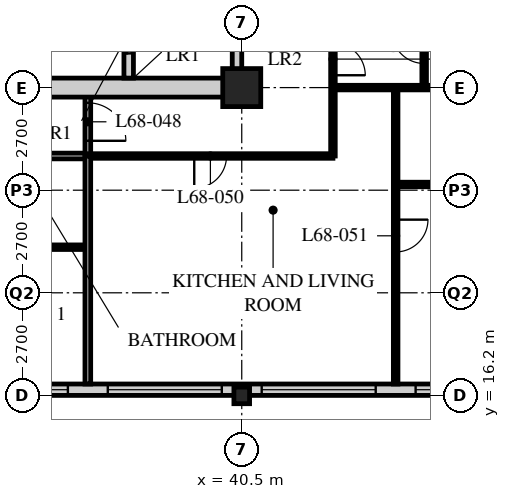
"""IFC4 building model, lengths in metres.
Left out: names, types, materials, properties, quantities, classifications, styles, units other than length and angle.
Written with IfcOpenShell. Run it as: python <this file> out.ifc"""

import sys

from ifc_helpers import new_model, si_unit, direction, frame, frame_2d, origin, origin_2d, place, context, subcontext, project, spatial, rectangle, hollow_rectangle, i_section, extrude, element, fill, save


model = new_model("IFC4")
c1 = context("Model", 3, precision=1e-05, world=origin(), true_north=direction((0.0, 1.0)))
c2 = subcontext(c1, "Body", "Model", "MODEL_VIEW")
j1 = project(units=[si_unit("LENGTHUNIT", "METRE"), si_unit("PLANEANGLEUNIT", "RADIAN")], contexts=[c1])
p1 = place(None, origin())
s1 = spatial("IfcSite", under=j1, at=p1, CompositionType="ELEMENT")
p2 = place(p1, origin())
s2 = spatial("IfcBuilding", under=s1, at=p2, CompositionType="ELEMENT")
p3 = place(p2, frame((0.0, 0.0, 265.8)))
s3 = spatial("IfcBuildingStorey", under=s2, at=p3, CompositionType="ELEMENT", Elevation=265.8)
p4 = place(p3, frame((40.5, 16.2, 0.0), z_axis=(0.0, 0.0, 1.0), x_axis=(1.0, 0.0, 0.0)))
e1 = element("IfcColumn", 1, at=p4, inside=s3, PredefinedType="COLUMN", context=c2, shape_type="SweptSolid", body=[
    extrude(i_section(OverallWidth=0.412, OverallDepth=0.437, WebThickness=0.036, FlangeThickness=0.058, FilletRadius=0.015, at=origin_2d()), origin(), (0.0, 0.0, 1.0), 3.9),
])
p5 = place(p3, frame((40.5, 24.3, 0.0), z_axis=(0.0, 0.0, 1.0), x_axis=(1.0, 0.0, 0.0)))
e2 = element("IfcColumn", 2, at=p5, inside=s3, PredefinedType="COLUMN", context=c2, shape_type="SweptSolid", body=[
    extrude(hollow_rectangle(XDim=1.0, YDim=1.0, WallThickness=0.1, at=origin_2d()), origin(), (0.0, 0.0, 1.0), 3.9),
])
p6 = place(p3, frame((8.4, 16.35, 0.0), z_axis=(0.0, 0.0, 1.0), x_axis=(1.0, 0.0, 0.0)))
e3 = element("IfcWall", 3, at=p6, inside=s3, PredefinedType="SOLIDWALL", context=c2, shape_type="SweptSolid", body=[
    extrude(rectangle(XDim=40.2, YDim=0.3, at=frame_2d((20.1, 0.0))), origin(), (0.0, 0.0, 1.0), 3.69),
])
p7 = place(p6, frame((0.225, 0.0, 0.6)))
e4 = element("IfcOpeningElement", 4, at=p7, cuts=e3, PredefinedType="OPENING", context=c2, shape_type="SweptSolid", body=[
    extrude(rectangle(XDim=3.0, YDim=2.4, at=frame_2d((1.5, 1.2))), frame((0.0, 0.16, 0.0), z_axis=(0.0, -1.0, 0.0), x_axis=(1.0, 0.0, 0.0)), (0.0, 0.0, 1.0), 0.32),
])
p8 = place(p6, frame((4.275, 0.0, 0.6)))
e5 = element("IfcOpeningElement", 5, at=p8, cuts=e3, PredefinedType="OPENING", context=c2, shape_type="SweptSolid", body=[
    extrude(rectangle(XDim=3.0, YDim=2.4, at=frame_2d((1.5, 1.2))), frame((0.0, 0.16, 0.0), z_axis=(0.0, -1.0, 0.0), x_axis=(1.0, 0.0, 0.0)), (0.0, 0.0, 1.0), 0.32),
])
p9 = place(p6, frame((8.325, 0.0, 0.6)))
e6 = element("IfcOpeningElement", 6, at=p9, cuts=e3, PredefinedType="OPENING", context=c2, shape_type="SweptSolid", body=[
    extrude(rectangle(XDim=3.0, YDim=2.4, at=frame_2d((1.5, 1.2))), frame((0.0, 0.16, 0.0), z_axis=(0.0, -1.0, 0.0), x_axis=(1.0, 0.0, 0.0)), (0.0, 0.0, 1.0), 0.32),
])
p10 = place(p6, frame((12.375, 0.0, 0.6)))
e7 = element("IfcOpeningElement", 7, at=p10, cuts=e3, PredefinedType="OPENING", context=c2, shape_type="SweptSolid", body=[
    extrude(rectangle(XDim=3.0, YDim=2.4, at=frame_2d((1.5, 1.2))), frame((0.0, 0.16, 0.0), z_axis=(0.0, -1.0, 0.0), x_axis=(1.0, 0.0, 0.0)), (0.0, 0.0, 1.0), 0.32),
])
p11 = place(p6, frame((16.425, 0.0, 0.6)))
e8 = element("IfcOpeningElement", 8, at=p11, cuts=e3, PredefinedType="OPENING", context=c2, shape_type="SweptSolid", body=[
    extrude(rectangle(XDim=3.0, YDim=2.4, at=frame_2d((1.5, 1.2))), frame((0.0, 0.16, 0.0), z_axis=(0.0, -1.0, 0.0), x_axis=(1.0, 0.0, 0.0)), (0.0, 0.0, 1.0), 0.32),
])
p12 = place(p6, frame((20.475, 0.0, 0.6)))
e9 = element("IfcOpeningElement", 9, at=p12, cuts=e3, PredefinedType="OPENING", context=c2, shape_type="SweptSolid", body=[
    extrude(rectangle(XDim=3.0, YDim=2.4, at=frame_2d((1.5, 1.2))), frame((0.0, 0.16, 0.0), z_axis=(0.0, -1.0, 0.0), x_axis=(1.0, 0.0, 0.0)), (0.0, 0.0, 1.0), 0.32),
])
p13 = place(p6, frame((24.525, 0.0, 0.6)))
e10 = element("IfcOpeningElement", 10, at=p13, cuts=e3, PredefinedType="OPENING", context=c2, shape_type="SweptSolid", body=[
    extrude(rectangle(XDim=3.0, YDim=2.4, at=frame_2d((1.5, 1.2))), frame((0.0, 0.16, 0.0), z_axis=(0.0, -1.0, 0.0), x_axis=(1.0, 0.0, 0.0)), (0.0, 0.0, 1.0), 0.32),
])
p14 = place(p6, frame((28.575, 0.0, 0.6)))
e11 = element("IfcOpeningElement", 11, at=p14, cuts=e3, PredefinedType="OPENING", context=c2, shape_type="SweptSolid", body=[
    extrude(rectangle(XDim=3.0, YDim=2.4, at=frame_2d((1.5, 1.2))), frame((0.0, 0.16, 0.0), z_axis=(0.0, -1.0, 0.0), x_axis=(1.0, 0.0, 0.0)), (0.0, 0.0, 1.0), 0.32),
])
p15 = place(p6, frame((32.625, 0.0, 0.6)))
e12 = element("IfcOpeningElement", 12, at=p15, cuts=e3, PredefinedType="OPENING", context=c2, shape_type="SweptSolid", body=[
    extrude(rectangle(XDim=3.0, YDim=2.4, at=frame_2d((1.5, 1.2))), frame((0.0, 0.16, 0.0), z_axis=(0.0, -1.0, 0.0), x_axis=(1.0, 0.0, 0.0)), (0.0, 0.0, 1.0), 0.32),
])
p16 = place(p6, frame((36.675, 0.0, 0.6)))
e13 = element("IfcOpeningElement", 13, at=p16, cuts=e3, PredefinedType="OPENING", context=c2, shape_type="SweptSolid", body=[
    extrude(rectangle(XDim=3.0, YDim=2.4, at=frame_2d((1.5, 1.2))), frame((0.0, 0.16, 0.0), z_axis=(0.0, -1.0, 0.0), x_axis=(1.0, 0.0, 0.0)), (0.0, 0.0, 1.0), 0.32),
])
p17 = place(p3, frame((8.1, 22.5, 0.0), z_axis=(0.0, 0.0, 1.0), x_axis=(1.0, 0.0, 0.0)))
e14 = element("IfcWall", 14, at=p17, inside=s3, PredefinedType="PARTITIONING", context=c2, shape_type="SweptSolid", body=[
    extrude(rectangle(XDim=28.35, YDim=0.15, at=frame_2d((14.175, 0.0))), origin(), (0.0, 0.0, 1.0), 3.69),
])
p18 = place(p17, frame((4.45, 0.0, 0.0)))
e15 = element("IfcOpeningElement", 15, at=p18, cuts=e14, PredefinedType="OPENING", context=c2, shape_type="SweptSolid", body=[
    extrude(rectangle(XDim=1.0, YDim=2.1, at=frame_2d((0.5, 1.05))), frame((0.0, 0.085, 0.0), z_axis=(0.0, -1.0, 0.0), x_axis=(1.0, 0.0, 0.0)), (0.0, 0.0, 1.0), 0.17),
])
p19 = place(p17, frame((12.55, 0.0, 0.0)))
e16 = element("IfcOpeningElement", 16, at=p19, cuts=e14, PredefinedType="OPENING", context=c2, shape_type="SweptSolid", body=[
    extrude(rectangle(XDim=1.0, YDim=2.1, at=frame_2d((0.5, 1.05))), frame((0.0, 0.085, 0.0), z_axis=(0.0, -1.0, 0.0), x_axis=(1.0, 0.0, 0.0)), (0.0, 0.0, 1.0), 0.17),
])
p20 = place(p17, frame((20.65, 0.0, 0.0)))
e17 = element("IfcOpeningElement", 17, at=p20, cuts=e14, PredefinedType="OPENING", context=c2, shape_type="SweptSolid", body=[
    extrude(rectangle(XDim=1.0, YDim=2.1, at=frame_2d((0.5, 1.05))), frame((0.0, 0.085, 0.0), z_axis=(0.0, -1.0, 0.0), x_axis=(1.0, 0.0, 0.0)), (0.0, 0.0, 1.0), 0.17),
])
p21 = place(p17, frame((2.625, 0.0, 0.0)))
e18 = element("IfcOpeningElement", 18, at=p21, cuts=e14, PredefinedType="OPENING", context=c2, shape_type="SweptSolid", body=[
    extrude(rectangle(XDim=1.0, YDim=2.1, at=frame_2d((0.5, 1.05))), frame((0.0, 0.085, 0.0), z_axis=(0.0, -1.0, 0.0), x_axis=(1.0, 0.0, 0.0)), (0.0, 0.0, 1.0), 0.17),
])
p22 = place(p3, frame((36.45, 22.5, 0.0), z_axis=(0.0, 0.0, 1.0), x_axis=(0.0, 1.0, 0.0)))
e19 = element("IfcWall", 19, at=p22, inside=s3, PredefinedType="PARTITIONING", context=c2, shape_type="SweptSolid", body=[
    extrude(rectangle(XDim=1.8, YDim=0.15, at=frame_2d((0.9, 0.0))), origin(), (0.0, 0.0, 1.0), 3.69),
])
p23 = place(p22, frame((0.4, 0.0, 0.0)))
e20 = element("IfcOpeningElement", 20, at=p23, cuts=e19, PredefinedType="OPENING", context=c2, shape_type="SweptSolid", body=[
    extrude(rectangle(XDim=1.0, YDim=2.1, at=frame_2d((0.5, 1.05))), frame((0.0, 0.085, 0.0), z_axis=(0.0, -1.0, 0.0), x_axis=(1.0, 0.0, 0.0)), (0.0, 0.0, 1.0), 0.17),
])
p24 = place(p3, frame((8.1, 20.1, 0.0), z_axis=(0.0, 0.0, 1.0), x_axis=(1.0, 0.0, 0.0)))
e21 = element("IfcWall", 21, at=p24, inside=s3, PredefinedType="PARTITIONING", context=c2, shape_type="SweptSolid", body=[
    extrude(rectangle(XDim=28.35, YDim=0.12, at=frame_2d((14.175, 0.0))), origin(), (0.0, 0.0, 1.0), 3.69),
])
p25 = place(p24, frame((5.025, 0.0, 0.0)))
e22 = element("IfcOpeningElement", 22, at=p25, cuts=e21, PredefinedType="OPENING", context=c2, shape_type="SweptSolid", body=[
    extrude(rectangle(XDim=0.85, YDim=2.1, at=frame_2d((0.425, 1.05))), frame((0.0, 0.07, 0.0), z_axis=(0.0, -1.0, 0.0), x_axis=(1.0, 0.0, 0.0)), (0.0, 0.0, 1.0), 0.14),
])
p26 = place(p24, frame((8.425, 0.0, 0.0)))
e23 = element("IfcOpeningElement", 23, at=p26, cuts=e21, PredefinedType="OPENING", context=c2, shape_type="SweptSolid", body=[
    extrude(rectangle(XDim=0.85, YDim=2.1, at=frame_2d((0.425, 1.05))), frame((0.0, 0.07, 0.0), z_axis=(0.0, -1.0, 0.0), x_axis=(1.0, 0.0, 0.0)), (0.0, 0.0, 1.0), 0.14),
])
p27 = place(p24, frame((13.125, 0.0, 0.0)))
e24 = element("IfcOpeningElement", 24, at=p27, cuts=e21, PredefinedType="OPENING", context=c2, shape_type="SweptSolid", body=[
    extrude(rectangle(XDim=0.85, YDim=2.1, at=frame_2d((0.425, 1.05))), frame((0.0, 0.07, 0.0), z_axis=(0.0, -1.0, 0.0), x_axis=(1.0, 0.0, 0.0)), (0.0, 0.0, 1.0), 0.14),
])
p28 = place(p24, frame((16.525, 0.0, 0.0)))
e25 = element("IfcOpeningElement", 25, at=p28, cuts=e21, PredefinedType="OPENING", context=c2, shape_type="SweptSolid", body=[
    extrude(rectangle(XDim=0.85, YDim=2.1, at=frame_2d((0.425, 1.05))), frame((0.0, 0.07, 0.0), z_axis=(0.0, -1.0, 0.0), x_axis=(1.0, 0.0, 0.0)), (0.0, 0.0, 1.0), 0.14),
])
p29 = place(p24, frame((21.225, 0.0, 0.0)))
e26 = element("IfcOpeningElement", 26, at=p29, cuts=e21, PredefinedType="OPENING", context=c2, shape_type="SweptSolid", body=[
    extrude(rectangle(XDim=0.85, YDim=2.1, at=frame_2d((0.425, 1.05))), frame((0.0, 0.07, 0.0), z_axis=(0.0, -1.0, 0.0), x_axis=(1.0, 0.0, 0.0)), (0.0, 0.0, 1.0), 0.14),
])
p30 = place(p24, frame((24.625, 0.0, 0.0)))
e27 = element("IfcOpeningElement", 27, at=p30, cuts=e21, PredefinedType="OPENING", context=c2, shape_type="SweptSolid", body=[
    extrude(rectangle(XDim=0.85, YDim=2.1, at=frame_2d((0.425, 1.05))), frame((0.0, 0.07, 0.0), z_axis=(0.0, -1.0, 0.0), x_axis=(1.0, 0.0, 0.0)), (0.0, 0.0, 1.0), 0.14),
])
p31 = place(p24, frame((2.725, 0.0, 0.0)))
e28 = element("IfcOpeningElement", 28, at=p31, cuts=e21, PredefinedType="OPENING", context=c2, shape_type="SweptSolid", body=[
    extrude(rectangle(XDim=0.85, YDim=2.1, at=frame_2d((0.425, 1.05))), frame((0.0, 0.07, 0.0), z_axis=(0.0, -1.0, 0.0), x_axis=(1.0, 0.0, 0.0)), (0.0, 0.0, 1.0), 0.14),
])
p32 = place(p3, frame((42.9, 22.5, 0.0), z_axis=(0.0, 0.0, 1.0), x_axis=(0.0, 1.0, 0.0)))
e29 = element("IfcWall", 29, at=p32, inside=s3, PredefinedType="PARTITIONING", context=c2, shape_type="SweptSolid", body=[
    extrude(rectangle(XDim=9.9, YDim=0.12, at=frame_2d((4.95, 0.0))), origin(), (0.0, 0.0, 1.0), 3.69),
])
p33 = place(p32, frame((2.125, 0.0, 0.0)))
e30 = element("IfcOpeningElement", 30, at=p33, cuts=e29, PredefinedType="OPENING", context=c2, shape_type="SweptSolid", body=[
    extrude(rectangle(XDim=0.85, YDim=2.1, at=frame_2d((0.425, 1.05))), frame((0.0, 0.07, 0.0), z_axis=(0.0, -1.0, 0.0), x_axis=(1.0, 0.0, 0.0)), (0.0, 0.0, 1.0), 0.14),
])
p34 = place(p32, frame((6.175, 0.0, 0.0)))
e31 = element("IfcOpeningElement", 31, at=p34, cuts=e29, PredefinedType="OPENING", context=c2, shape_type="SweptSolid", body=[
    extrude(rectangle(XDim=0.85, YDim=2.1, at=frame_2d((0.425, 1.05))), frame((0.0, 0.07, 0.0), z_axis=(0.0, -1.0, 0.0), x_axis=(1.0, 0.0, 0.0)), (0.0, 0.0, 1.0), 0.14),
])
p35 = place(p3, frame((36.45, 22.5, 0.0), z_axis=(0.0, 0.0, 1.0), x_axis=(1.0, 0.0, 0.0)))
e32 = element("IfcWall", 32, at=p35, inside=s3, PredefinedType="PARTITIONING", context=c2, shape_type="SweptSolid", body=[
    extrude(rectangle(XDim=6.45, YDim=0.12, at=frame_2d((3.225, 0.0))), origin(), (0.0, 0.0, 1.0), 3.69),
])
p36 = place(p35, frame((2.8, 0.0, 0.0)))
e33 = element("IfcOpeningElement", 33, at=p36, cuts=e32, PredefinedType="OPENING", context=c2, shape_type="SweptSolid", body=[
    extrude(rectangle(XDim=0.85, YDim=2.1, at=frame_2d((0.425, 1.05))), frame((0.0, 0.07, 0.0), z_axis=(0.0, -1.0, 0.0), x_axis=(1.0, 0.0, 0.0)), (0.0, 0.0, 1.0), 0.14),
])
p37 = place(p3, frame((42.9, 24.3, 0.0), z_axis=(0.0, 0.0, 1.0), x_axis=(1.0, 0.0, 0.0)))
e34 = element("IfcWall", 34, at=p37, inside=s3, PredefinedType="PARTITIONING", context=c2, shape_type="SweptSolid", body=[
    extrude(rectangle(XDim=9.45, YDim=0.12, at=frame_2d((4.725, 0.0))), origin(), (0.0, 0.0, 1.0), 3.078),
])
p38 = place(p3, frame((36.45, 16.5, 0.0), z_axis=(0.0, 0.0, 1.0), x_axis=(0.0, 1.0, 0.0)))
e35 = element("IfcWall", 35, at=p38, inside=s3, PredefinedType="PARTITIONING", context=c2, shape_type="SweptSolid", body=[
    extrude(rectangle(XDim=6.0, YDim=0.15, at=frame_2d((3.0, 0.0))), origin(), (0.0, 0.0, 1.0), 3.69),
])
p39 = place(p3, frame((44.55, 16.5, 0.0), z_axis=(0.0, 0.0, 1.0), x_axis=(0.0, 1.0, 0.0)))
e36 = element("IfcWall", 36, at=p39, inside=s3, PredefinedType="PARTITIONING", context=c2, shape_type="SweptSolid", body=[
    extrude(rectangle(XDim=7.8, YDim=0.12, at=frame_2d((3.9, 0.0))), origin(), (0.0, 0.0, 1.0), 3.69),
])
p40 = place(p39, frame((3.475, 0.0, 0.0)))
e37 = element("IfcOpeningElement", 37, at=p40, cuts=e36, PredefinedType="OPENING", context=c2, shape_type="SweptSolid", body=[
    extrude(rectangle(XDim=0.85, YDim=2.1, at=frame_2d((0.425, 1.05))), frame((0.0, 0.07, 0.0), z_axis=(0.0, -1.0, 0.0), x_axis=(1.0, 0.0, 0.0)), (0.0, 0.0, 1.0), 0.14),
])
p41 = place(p3, frame((45.3, 24.3, 0.0), z_axis=(0.0, 0.0, 1.0), x_axis=(0.0, 1.0, 0.0)))
e38 = element("IfcWall", 38, at=p41, inside=s3, PredefinedType="PARTITIONING", context=c2, shape_type="SweptSolid", body=[
    extrude(rectangle(XDim=1.76, YDim=0.12, at=frame_2d((0.88, 0.0))), origin(), (0.0, 0.0, 1.0), 3.69),
])
p42 = place(p41, frame((0.635, 0.0, 0.0)))
e39 = element("IfcOpeningElement", 39, at=p42, cuts=e38, PredefinedType="OPENING", context=c2, shape_type="SweptSolid", body=[
    extrude(rectangle(XDim=0.85, YDim=2.1, at=frame_2d((0.425, 1.05))), frame((0.0, 0.07, 0.0), z_axis=(0.0, -1.0, 0.0), x_axis=(1.0, 0.0, 0.0)), (0.0, 0.0, 1.0), 0.14),
])
p43 = place(p3, frame((44.55, 21.75, 0.0), z_axis=(0.0, 0.0, 1.0), x_axis=(1.0, 0.0, 0.0)))
e40 = element("IfcWall", 40, at=p43, inside=s3, PredefinedType="PARTITIONING", context=c2, shape_type="SweptSolid", body=[
    extrude(rectangle(XDim=7.8, YDim=0.12, at=frame_2d((3.9, 0.0))), origin(), (0.0, 0.0, 1.0), 3.69),
])
p44 = place(p43, frame((3.475, 0.0, 0.0)))
e41 = element("IfcOpeningElement", 41, at=p44, cuts=e40, PredefinedType="OPENING", context=c2, shape_type="SweptSolid", body=[
    extrude(rectangle(XDim=0.85, YDim=2.1, at=frame_2d((0.425, 1.05))), frame((0.0, 0.07, 0.0), z_axis=(0.0, -1.0, 0.0), x_axis=(1.0, 0.0, 0.0)), (0.0, 0.0, 1.0), 0.14),
])
p45 = place(p3, frame((15.95, 24.3, 0.0), z_axis=(0.0, 0.0, 1.0), x_axis=(1.0, 0.0, 0.0)))
e42 = element("IfcWall", 42, at=p45, inside=s3, PredefinedType="SOLIDWALL", context=c2, shape_type="SweptSolid", body=[
    extrude(rectangle(XDim=24.55, YDim=0.5, at=frame_2d((12.275, 0.0))), origin(), (0.0, 0.0, 1.0), 3.04),
])
p46 = place(p45, frame((11.5, 0.0, 0.0)))
e43 = element("IfcOpeningElement", 43, at=p46, cuts=e42, PredefinedType="OPENING", context=c2, shape_type="SweptSolid", body=[
    extrude(rectangle(XDim=1.8, YDim=2.4, at=frame_2d((0.9, 1.2))), frame((0.0, 0.26, 0.0), z_axis=(0.0, -1.0, 0.0), x_axis=(1.0, 0.0, 0.0)), (0.0, 0.0, 1.0), 0.52),
])
p47 = place(p3, frame((40.375, 24.55, 0.0), z_axis=(0.0, 0.0, 1.0), x_axis=(0.0, 1.0, 0.0)))
e44 = element("IfcWall", 44, at=p47, inside=s3, PredefinedType="SOLIDWALL", context=c2, shape_type="SweptSolid", body=[
    extrude(rectangle(XDim=15.7, YDim=0.25, at=frame_2d((7.85, 0.0))), origin(), (0.0, 0.0, 1.0), 3.078),
])
p48 = place(p3, frame((37.525, 24.55, 0.0), z_axis=(0.0, 0.0, 1.0), x_axis=(0.0, 1.0, 0.0)))
e45 = element("IfcWall", 45, at=p48, inside=s3, PredefinedType="SOLIDWALL", context=c2, shape_type="SweptSolid", body=[
    extrude(rectangle(XDim=7.75, YDim=0.25, at=frame_2d((3.875, 0.0))), origin(), (0.0, 0.0, 1.0), 3.69),
])
p49 = place(p48, frame((0.65, 0.0, 0.0)))
e46 = element("IfcOpeningElement", 46, at=p49, cuts=e45, PredefinedType="OPENING", context=c2, shape_type="SweptSolid", body=[
    extrude(rectangle(XDim=1.1, YDim=2.4, at=frame_2d((0.55, 1.2))), frame((0.0, 0.135, 0.0), z_axis=(0.0, -1.0, 0.0), x_axis=(1.0, 0.0, 0.0)), (0.0, 0.0, 1.0), 0.27),
])
p50 = place(p48, frame((3.25, 0.0, 0.0)))
e47 = element("IfcOpeningElement", 47, at=p50, cuts=e45, PredefinedType="OPENING", context=c2, shape_type="SweptSolid", body=[
    extrude(rectangle(XDim=1.1, YDim=2.4, at=frame_2d((0.55, 1.2))), frame((0.0, 0.135, 0.0), z_axis=(0.0, -1.0, 0.0), x_axis=(1.0, 0.0, 0.0)), (0.0, 0.0, 1.0), 0.27),
])
p51 = place(p48, frame((5.85, 0.0, 0.0)))
e48 = element("IfcOpeningElement", 48, at=p51, cuts=e45, PredefinedType="OPENING", context=c2, shape_type="SweptSolid", body=[
    extrude(rectangle(XDim=1.1, YDim=2.4, at=frame_2d((0.55, 1.2))), frame((0.0, 0.135, 0.0), z_axis=(0.0, -1.0, 0.0), x_axis=(1.0, 0.0, 0.0)), (0.0, 0.0, 1.0), 0.27),
])
p52 = place(p13, origin())
e49 = element("IfcWindow", 49, at=p52, inside=s3, PartitioningType="SINGLE_PANEL", PredefinedType="WINDOW", context=c2, shape_type="SweptSolid", body=[
    extrude(rectangle(XDim=3.0, YDim=2.4, at=frame_2d((1.5, 1.2))), frame((0.0, 0.03, 0.0), z_axis=(0.0, -1.0, 0.0), x_axis=(1.0, 0.0, 0.0)), (0.0, 0.0, 1.0), 0.06),
])
fill(e10, e49)
p53 = place(p14, origin())
e50 = element("IfcWindow", 50, at=p53, inside=s3, PartitioningType="SINGLE_PANEL", PredefinedType="WINDOW", context=c2, shape_type="SweptSolid", body=[
    extrude(rectangle(XDim=3.0, YDim=2.4, at=frame_2d((1.5, 1.2))), frame((0.0, 0.03, 0.0), z_axis=(0.0, -1.0, 0.0), x_axis=(1.0, 0.0, 0.0)), (0.0, 0.0, 1.0), 0.06),
])
fill(e11, e50)
p54 = place(p15, origin())
e51 = element("IfcWindow", 51, at=p54, inside=s3, PartitioningType="SINGLE_PANEL", PredefinedType="WINDOW", context=c2, shape_type="SweptSolid", body=[
    extrude(rectangle(XDim=3.0, YDim=2.4, at=frame_2d((1.5, 1.2))), frame((0.0, 0.03, 0.0), z_axis=(0.0, -1.0, 0.0), x_axis=(1.0, 0.0, 0.0)), (0.0, 0.0, 1.0), 0.06),
])
fill(e12, e51)
p55 = place(p16, origin())
e52 = element("IfcWindow", 52, at=p55, inside=s3, PartitioningType="SINGLE_PANEL", PredefinedType="WINDOW", context=c2, shape_type="SweptSolid", body=[
    extrude(rectangle(XDim=3.0, YDim=2.4, at=frame_2d((1.5, 1.2))), frame((0.0, 0.03, 0.0), z_axis=(0.0, -1.0, 0.0), x_axis=(1.0, 0.0, 0.0)), (0.0, 0.0, 1.0), 0.06),
])
fill(e13, e52)
p56 = place(p23, origin())
e53 = element("IfcDoor", 53, at=p56, inside=s3, OperationType="SINGLE_SWING_RIGHT", PredefinedType="DOOR", context=c2, shape_type="SweptSolid", body=[
    extrude(rectangle(XDim=1.0, YDim=2.1, at=frame_2d((0.5, 1.05))), frame((0.0, 0.025, 0.0), z_axis=(0.0, -1.0, 0.0), x_axis=(1.0, 0.0, 0.0)), (0.0, 0.0, 1.0), 0.05),
])
fill(e20, e53)
p57 = place(p36, origin())
e54 = element("IfcDoor", 54, at=p57, inside=s3, OperationType="SINGLE_SWING_RIGHT", PredefinedType="DOOR", context=c2, shape_type="SweptSolid", body=[
    extrude(rectangle(XDim=0.85, YDim=2.1, at=frame_2d((0.425, 1.05))), frame((0.0, 0.025, 0.0), z_axis=(0.0, -1.0, 0.0), x_axis=(1.0, 0.0, 0.0)), (0.0, 0.0, 1.0), 0.05),
])
fill(e33, e54)
p58 = place(p40, origin())
e55 = element("IfcDoor", 55, at=p58, inside=s3, OperationType="SINGLE_SWING_LEFT", PredefinedType="DOOR", context=c2, shape_type="SweptSolid", body=[
    extrude(rectangle(XDim=0.85, YDim=2.1, at=frame_2d((0.425, 1.05))), frame((0.0, 0.025, 0.0), z_axis=(0.0, -1.0, 0.0), x_axis=(1.0, 0.0, 0.0)), (0.0, 0.0, 1.0), 0.05),
])
fill(e37, e55)
p59 = place(p33, origin())
e56 = element("IfcDoor", 56, at=p59, inside=s3, OperationType="SINGLE_SWING_RIGHT", PredefinedType="DOOR", context=c2, shape_type="SweptSolid", body=[
    extrude(rectangle(XDim=0.85, YDim=2.1, at=frame_2d((0.425, 1.05))), frame((0.0, 0.025, 0.0), z_axis=(0.0, -1.0, 0.0), x_axis=(1.0, 0.0, 0.0)), (0.0, 0.0, 1.0), 0.05),
])
fill(e30, e56)
p60 = place(p42, origin())
e57 = element("IfcDoor", 57, at=p60, inside=s3, OperationType="SINGLE_SWING_RIGHT", PredefinedType="DOOR", context=c2, shape_type="SweptSolid", body=[
    extrude(rectangle(XDim=0.85, YDim=2.1, at=frame_2d((0.425, 1.05))), frame((0.0, 0.025, 0.0), z_axis=(0.0, -1.0, 0.0), x_axis=(1.0, 0.0, 0.0)), (0.0, 0.0, 1.0), 0.05),
])
fill(e39, e57)
p61 = place(p49, origin())
e58 = element("IfcDoor", 58, at=p61, inside=s3, OperationType="DOUBLE_DOOR_SLIDING", PredefinedType="DOOR", context=c2, shape_type="SweptSolid", body=[
    extrude(rectangle(XDim=1.1, YDim=2.4, at=frame_2d((0.55, 1.2))), frame((0.0, 0.025, 0.0), z_axis=(0.0, -1.0, 0.0), x_axis=(1.0, 0.0, 0.0)), (0.0, 0.0, 1.0), 0.05),
])
fill(e46, e58)
save(model, sys.argv[1])
